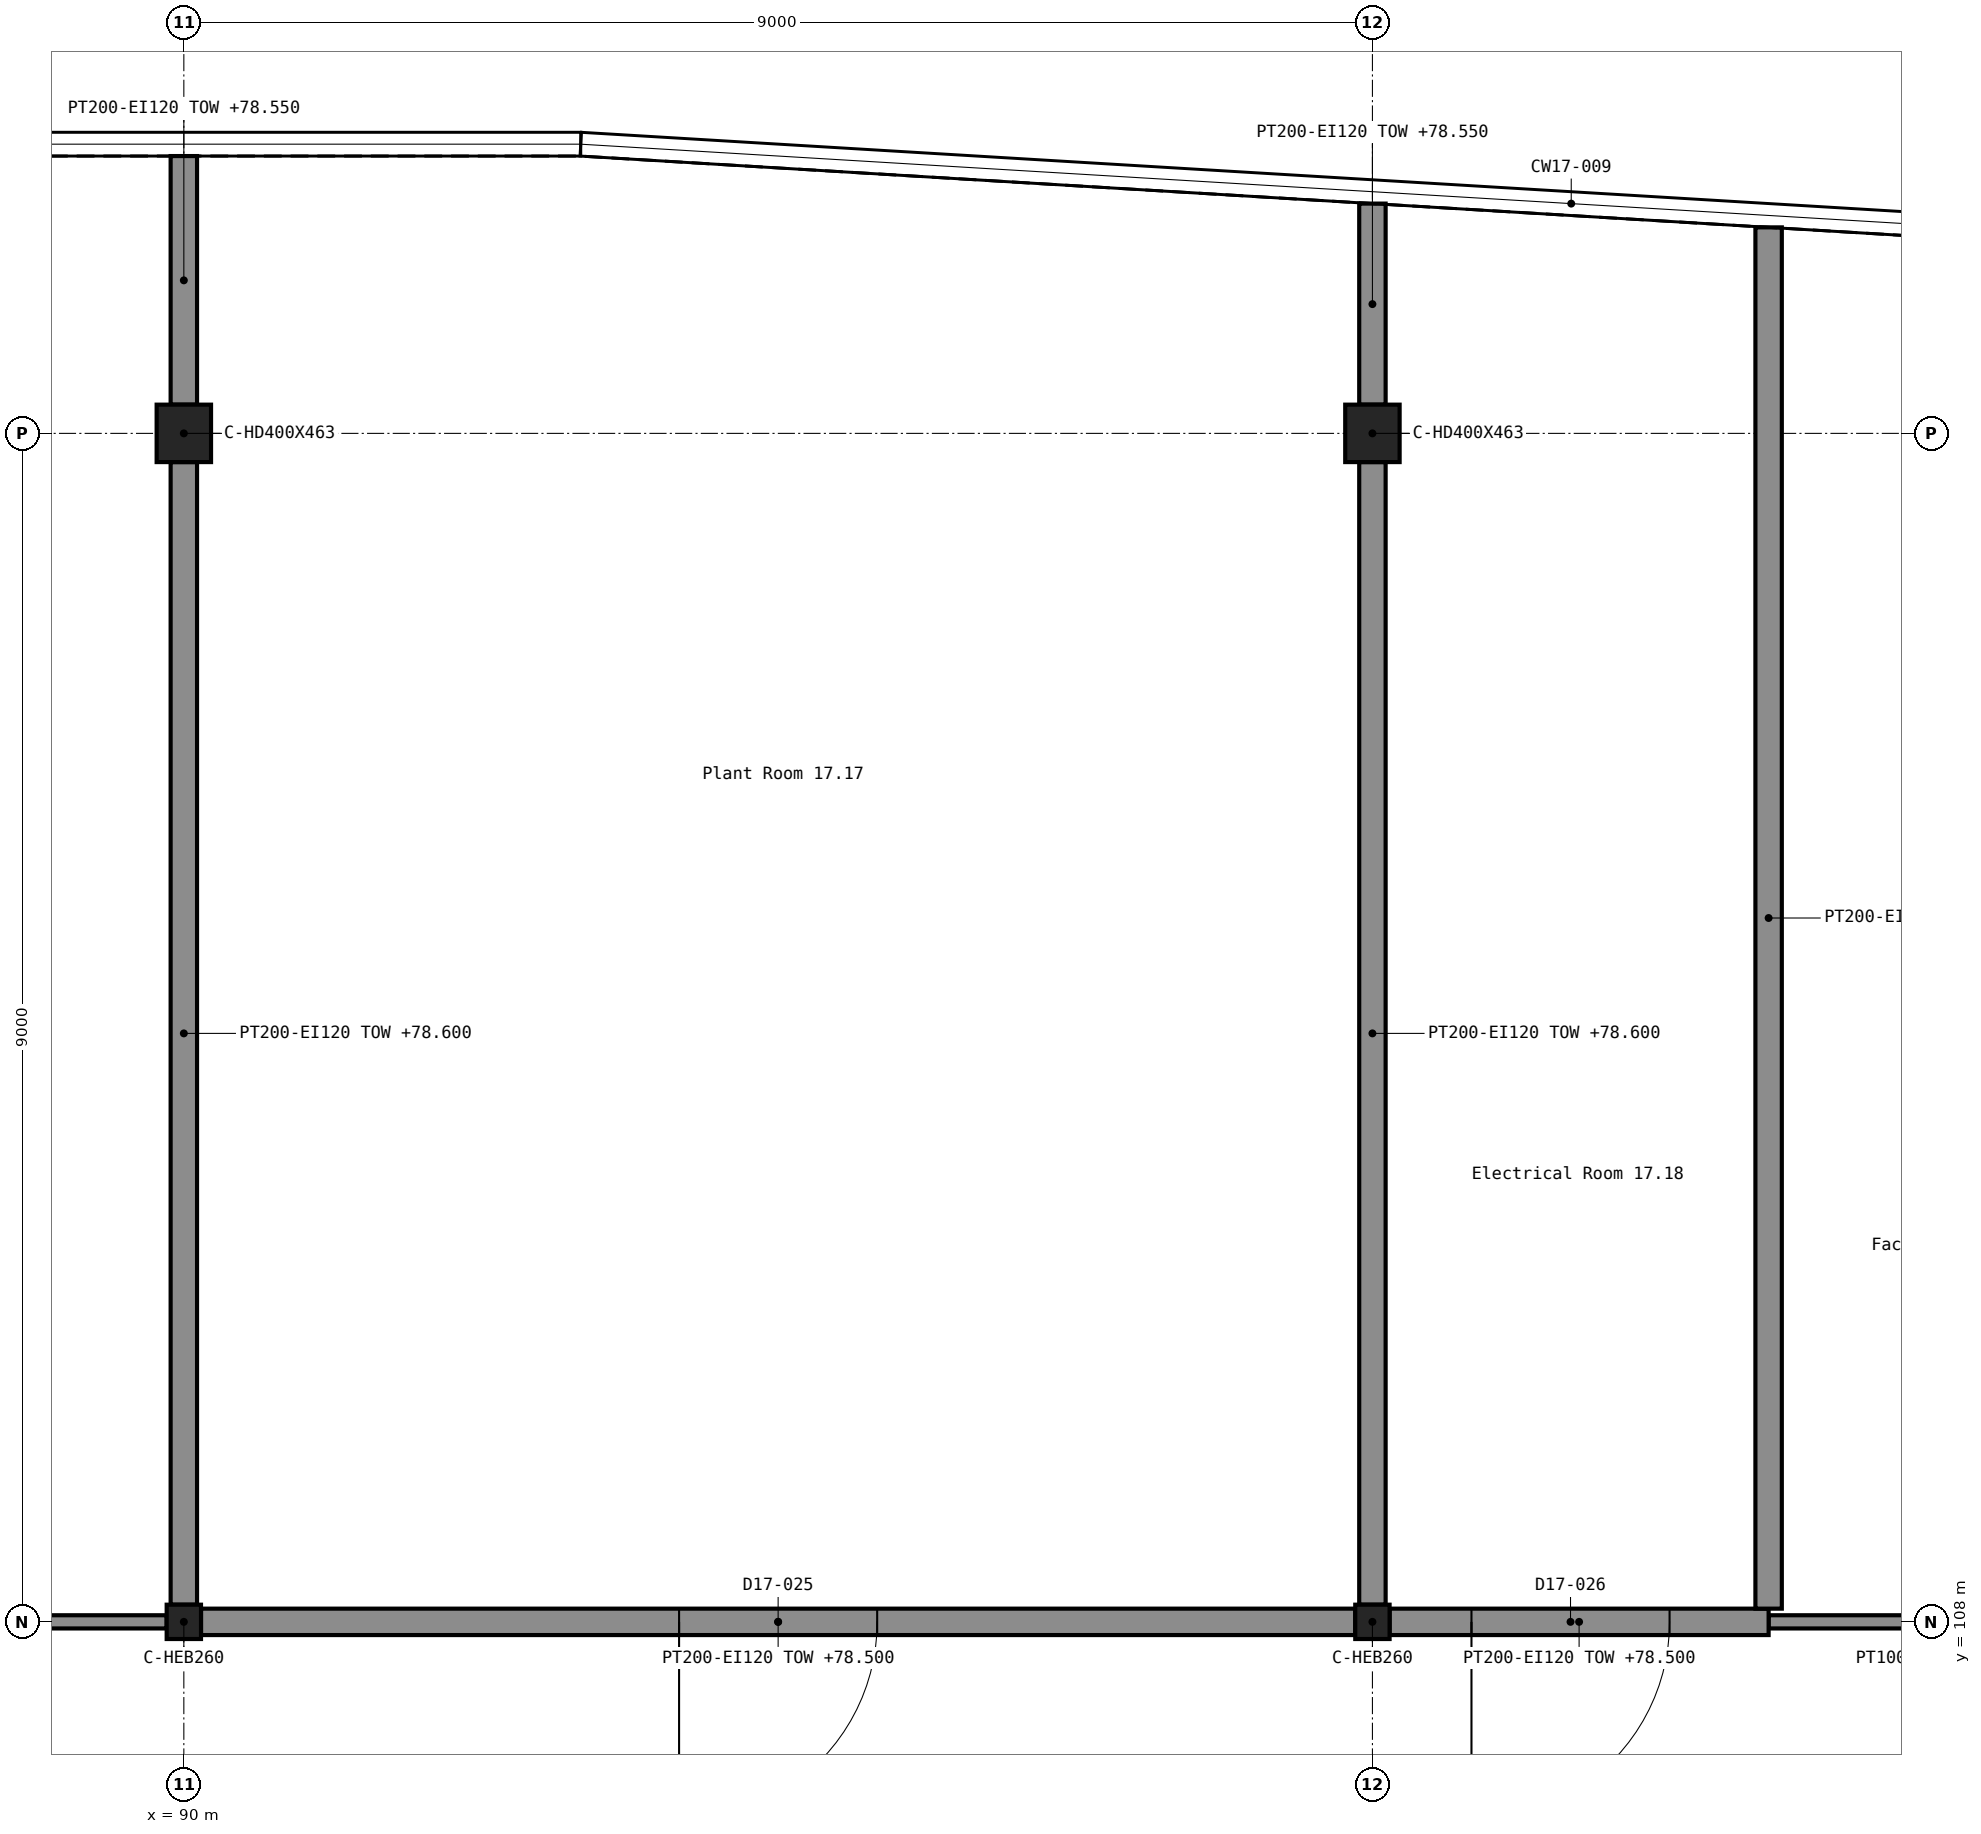
"""IFC4 building model, lengths in metres.
Left out: names, types, materials, properties, quantities, classifications, styles, units other than length and angle.
Written with IfcOpenShell. Run it as: python <this file> out.ifc"""

import sys

from ifc_helpers import new_model, si_unit, direction, frame, frame_2d, origin, origin_2d, place, context, subcontext, project, spatial, rectangle, i_section, extrude, element, fill, save


model = new_model("IFC4")
c1 = context("Model", 3, precision=1e-05, world=origin(), true_north=direction((0.0, 1.0)))
c2 = subcontext(c1, "Body", "Model", "MODEL_VIEW")
j1 = project(units=[si_unit("LENGTHUNIT", "METRE"), si_unit("PLANEANGLEUNIT", "RADIAN")], contexts=[c1])
p1 = place(None, origin())
s1 = spatial("IfcSite", under=j1, at=p1, CompositionType="ELEMENT")
p2 = place(p1, origin())
s2 = spatial("IfcBuilding", under=s1, at=p2, CompositionType="ELEMENT")
p3 = place(p2, frame((0.0, 0.0, 75.3)))
s3 = spatial("IfcBuildingStorey", under=s2, at=p3, CompositionType="ELEMENT", Elevation=75.3)
for number, where, z_axis, x_axis in (
    (1, (90.0, 108.0, 0.0), (0.0, 0.0, 1.0), (1.0, 0.0, 0.0)),
    (2, (99.0, 108.0, 0.0), (0.0, 0.0, 1.0), (1.0, 0.0, 0.0)),
):
    element("IfcColumn", number, at=place(p3, frame(where, z_axis=z_axis, x_axis=x_axis)), inside=s3, PredefinedType="COLUMN", context=c2, shape_type="SweptSolid", body=[
        extrude(i_section(OverallWidth=0.26, OverallDepth=0.26, WebThickness=0.01, FlangeThickness=0.018, FilletRadius=0.024, at=origin_2d()), origin(), (0.0, 0.0, 1.0), 3.9),
    ])
for number, where, z_axis, x_axis in (
    (3, (90.0, 117.0, 0.0), (0.0, 0.0, 1.0), (1.0, 0.0, 0.0)),
    (4, (99.0, 117.0, 0.0), (0.0, 0.0, 1.0), (1.0, 0.0, 0.0)),
):
    element("IfcColumn", number, at=place(p3, frame(where, z_axis=z_axis, x_axis=x_axis)), inside=s3, PredefinedType="COLUMN", context=c2, shape_type="SweptSolid", body=[
        extrude(i_section(OverallWidth=0.412, OverallDepth=0.435, WebThickness=0.036, FlangeThickness=0.057, FilletRadius=0.015, at=origin_2d()), origin(), (0.0, 0.0, 1.0), 3.9),
    ])
p4 = place(p3, frame((104.799, 118.267, 3.9), z_axis=(0.0, 0.0, 1.0), x_axis=(-0.99820652349, 0.059864317109, 0.0)))
e5 = element("IfcWall", 5, at=p4, inside=s3, PredefinedType="PARAPET", context=c2, shape_type="SweptSolid", body=[
    extrude(rectangle(XDim=2.957, YDim=0.25, at=frame_2d((1.479, 0.0))), origin(), (0.0, 0.0, 1.0), 1.6),
])
p5 = place(p3, frame((101.847, 118.444, 3.9), z_axis=(0.0, 0.0, 1.0), x_axis=(-0.998201882594, 0.059941651511, 0.0)))
e6 = element("IfcWall", 6, at=p5, inside=s3, PredefinedType="PARAPET", context=c2, shape_type="SweptSolid", body=[
    extrude(rectangle(XDim=2.957, YDim=0.25, at=frame_2d((1.479, 0.0))), origin(), (0.0, 0.0, 1.0), 1.3),
])
p6 = place(p3, frame((98.896, 118.621, 3.9), z_axis=(0.0, 0.0, 1.0), x_axis=(-0.99820652349, 0.059864317109, 0.0)))
e7 = element("IfcWall", 7, at=p6, inside=s3, PredefinedType="PARAPET", context=c2, shape_type="SweptSolid", body=[
    extrude(rectangle(XDim=2.957, YDim=0.25, at=frame_2d((1.479, 0.0))), origin(), (0.0, 0.0, 1.0), 1.1),
])
p7 = place(p3, frame((95.944, 118.798, 3.9), z_axis=(0.0, 0.0, 1.0), x_axis=(-0.998201882594, 0.059941651511, 0.0)))
e8 = element("IfcWall", 8, at=p7, inside=s3, PredefinedType="PARAPET", context=c2, shape_type="SweptSolid", body=[
    extrude(rectangle(XDim=2.957, YDim=0.25, at=frame_2d((1.479, 0.0))), origin(), (0.0, 0.0, 1.0), 1.2),
])
p8 = place(p3, frame((92.996, 118.975, 3.9), z_axis=(0.0, 0.0, 1.0), x_axis=(-1.0, 0.0, 0.0)))
e9 = element("IfcWall", 9, at=p8, inside=s3, PredefinedType="PARAPET", context=c2, shape_type="SweptSolid", body=[
    extrude(rectangle(XDim=2.999, YDim=0.25, at=frame_2d((1.5, 0.0))), origin(), (0.0, 0.0, 1.0), 1.4),
])
p9 = place(p3, frame((89.997, 118.975, 3.9), z_axis=(0.0, 0.0, 1.0), x_axis=(-1.0, 0.0, 0.0)))
e10 = element("IfcWall", 10, at=p9, inside=s3, PredefinedType="PARAPET", context=c2, shape_type="SweptSolid", body=[
    extrude(rectangle(XDim=2.999, YDim=0.25, at=frame_2d((1.5, 0.0))), origin(), (0.0, 0.0, 1.0), 1.8),
])
p10 = place(p3, frame((81.13, 108.0, 0.0), z_axis=(0.0, 0.0, 1.0), x_axis=(1.0, 0.0, 0.0)))
e11 = element("IfcWall", 11, at=p10, inside=s3, PredefinedType="PARTITIONING", context=c2, shape_type="SweptSolid", body=[
    extrude(rectangle(XDim=8.74, YDim=0.1, at=frame_2d((4.37, 0.0))), origin(), (0.0, 0.0, 1.0), 3.2),
])
p11 = place(p10, frame((5.845, 0.0, 0.0)))
e12 = element("IfcOpeningElement", 12, at=p11, cuts=e11, PredefinedType="OPENING", context=c2, shape_type="SweptSolid", body=[
    extrude(rectangle(XDim=1.8, YDim=2.1, at=frame_2d((0.9, 1.05))), frame((0.0, 0.061, 0.0), z_axis=(0.0, -1.0, 0.0), x_axis=(1.0, 0.0, 0.0)), (0.0, 0.0, 1.0), 0.122),
])
p12 = place(p3, frame((102.0, 108.0, 0.0), z_axis=(0.0, 0.0, 1.0), x_axis=(1.0, 0.0, 0.0)))
e13 = element("IfcWall", 13, at=p12, inside=s3, PredefinedType="PARTITIONING", context=c2, shape_type="SweptSolid", body=[
    extrude(rectangle(XDim=3.0, YDim=0.1, at=frame_2d((1.5, 0.0))), origin(), (0.0, 0.0, 1.0), 3.2),
])
p13 = place(p12, frame((1.05, 0.0, 0.0)))
e14 = element("IfcOpeningElement", 14, at=p13, cuts=e13, PredefinedType="OPENING", context=c2, shape_type="SweptSolid", body=[
    extrude(rectangle(XDim=0.9, YDim=2.1, at=frame_2d((0.45, 1.05))), frame((0.0, 0.061, 0.0), z_axis=(0.0, -1.0, 0.0), x_axis=(1.0, 0.0, 0.0)), (0.0, 0.0, 1.0), 0.122),
])
p14 = place(p3, frame((90.13, 108.0, 0.0), z_axis=(0.0, 0.0, 1.0), x_axis=(1.0, 0.0, 0.0)))
e15 = element("IfcWall", 15, at=p14, inside=s3, PredefinedType="PARTITIONING", context=c2, shape_type="SweptSolid", body=[
    extrude(rectangle(XDim=8.74, YDim=0.2, at=frame_2d((4.37, 0.0))), origin(), (0.0, 0.0, 1.0), 3.2),
])
p15 = place(p14, frame((3.62, 0.0, 0.0)))
e16 = element("IfcOpeningElement", 16, at=p15, cuts=e15, PredefinedType="OPENING", context=c2, shape_type="SweptSolid", body=[
    extrude(rectangle(XDim=1.5, YDim=2.4, at=frame_2d((0.75, 1.2))), frame((0.0, 0.111, 0.0), z_axis=(0.0, -1.0, 0.0), x_axis=(1.0, 0.0, 0.0)), (0.0, 0.0, 1.0), 0.222),
])
p16 = place(p3, frame((99.13, 108.0, 0.0), z_axis=(0.0, 0.0, 1.0), x_axis=(1.0, 0.0, 0.0)))
e17 = element("IfcWall", 17, at=p16, inside=s3, PredefinedType="PARTITIONING", context=c2, shape_type="SweptSolid", body=[
    extrude(rectangle(XDim=2.87, YDim=0.2, at=frame_2d((1.435, 0.0))), origin(), (0.0, 0.0, 1.0), 3.2),
])
p17 = place(p16, frame((0.62, 0.0, 0.0)))
e18 = element("IfcOpeningElement", 18, at=p17, cuts=e17, PredefinedType="OPENING", context=c2, shape_type="SweptSolid", body=[
    extrude(rectangle(XDim=1.5, YDim=2.4, at=frame_2d((0.75, 1.2))), frame((0.0, 0.111, 0.0), z_axis=(0.0, -1.0, 0.0), x_axis=(1.0, 0.0, 0.0)), (0.0, 0.0, 1.0), 0.222),
])
p18 = place(p3, frame((90.0, 108.13, 0.0), z_axis=(0.0, 0.0, 1.0), x_axis=(0.0, 1.0, 0.0)))
e19 = element("IfcWall", 19, at=p18, inside=s3, PredefinedType="PARTITIONING", context=c2, shape_type="SweptSolid", body=[
    extrude(rectangle(XDim=8.653, YDim=0.2, at=frame_2d((4.326, 0.0))), origin(), (0.0, 0.0, 1.0), 3.3),
])
p19 = place(p3, frame((90.0, 117.218, 0.0), z_axis=(0.0, 0.0, 1.0), x_axis=(0.0, 1.0, 0.0)))
e20 = element("IfcWall", 20, at=p19, inside=s3, PredefinedType="PARTITIONING", context=c2, shape_type="SweptSolid", body=[
    extrude(rectangle(XDim=1.883, YDim=0.2, at=frame_2d((0.941, 0.0))), origin(), (0.0, 0.0, 1.0), 3.25),
])
p20 = place(p3, frame((99.0, 108.13, 0.0), z_axis=(0.0, 0.0, 1.0), x_axis=(0.0, 1.0, 0.0)))
e21 = element("IfcWall", 21, at=p20, inside=s3, PredefinedType="PARTITIONING", context=c2, shape_type="SweptSolid", body=[
    extrude(rectangle(XDim=8.653, YDim=0.2, at=frame_2d((4.326, 0.0))), origin(), (0.0, 0.0, 1.0), 3.3),
])
p21 = place(p3, frame((99.0, 117.218, 0.0), z_axis=(0.0, 0.0, 1.0), x_axis=(0.0, 1.0, 0.0)))
e22 = element("IfcWall", 22, at=p21, inside=s3, PredefinedType="PARTITIONING", context=c2, shape_type="SweptSolid", body=[
    extrude(rectangle(XDim=1.522, YDim=0.2, at=frame_2d((0.761, 0.0))), origin(), (0.0, 0.0, 1.0), 3.25),
])
p22 = place(p3, frame((102.0, 108.1, 0.0), z_axis=(0.0, 0.0, 1.0), x_axis=(0.0, 1.0, 0.0)))
e23 = element("IfcWall", 23, at=p22, inside=s3, PredefinedType="PARTITIONING", context=c2, shape_type="SweptSolid", body=[
    extrude(rectangle(XDim=10.46, YDim=0.2, at=frame_2d((5.23, 0.0))), origin(), (0.0, 0.0, 1.0), 3.25),
])
p23 = place(p15, frame((1.5, 0.0, 0.0), z_axis=(0.0, 0.0, 1.0), x_axis=(-1.0, 0.0, 0.0)))
e24 = element("IfcDoor", 24, at=p23, inside=s3, OperationType="DOUBLE_DOOR_SINGLE_SWING", PredefinedType="DOOR", context=c2, shape_type="SweptSolid", body=[
    extrude(rectangle(XDim=1.5, YDim=2.4, at=frame_2d((0.75, 1.2))), frame((0.0, 0.025, 0.0), z_axis=(0.0, -1.0, 0.0), x_axis=(1.0, 0.0, 0.0)), (0.0, 0.0, 1.0), 0.05),
])
fill(e16, e24)
p24 = place(p17, frame((1.5, 0.0, 0.0), z_axis=(0.0, 0.0, 1.0), x_axis=(-1.0, 0.0, 0.0)))
e25 = element("IfcDoor", 25, at=p24, inside=s3, OperationType="DOUBLE_DOOR_SINGLE_SWING", PredefinedType="DOOR", context=c2, shape_type="SweptSolid", body=[
    extrude(rectangle(XDim=1.5, YDim=2.4, at=frame_2d((0.75, 1.2))), frame((0.0, 0.025, 0.0), z_axis=(0.0, -1.0, 0.0), x_axis=(1.0, 0.0, 0.0)), (0.0, 0.0, 1.0), 0.05),
])
fill(e18, e25)
save(model, sys.argv[1])
